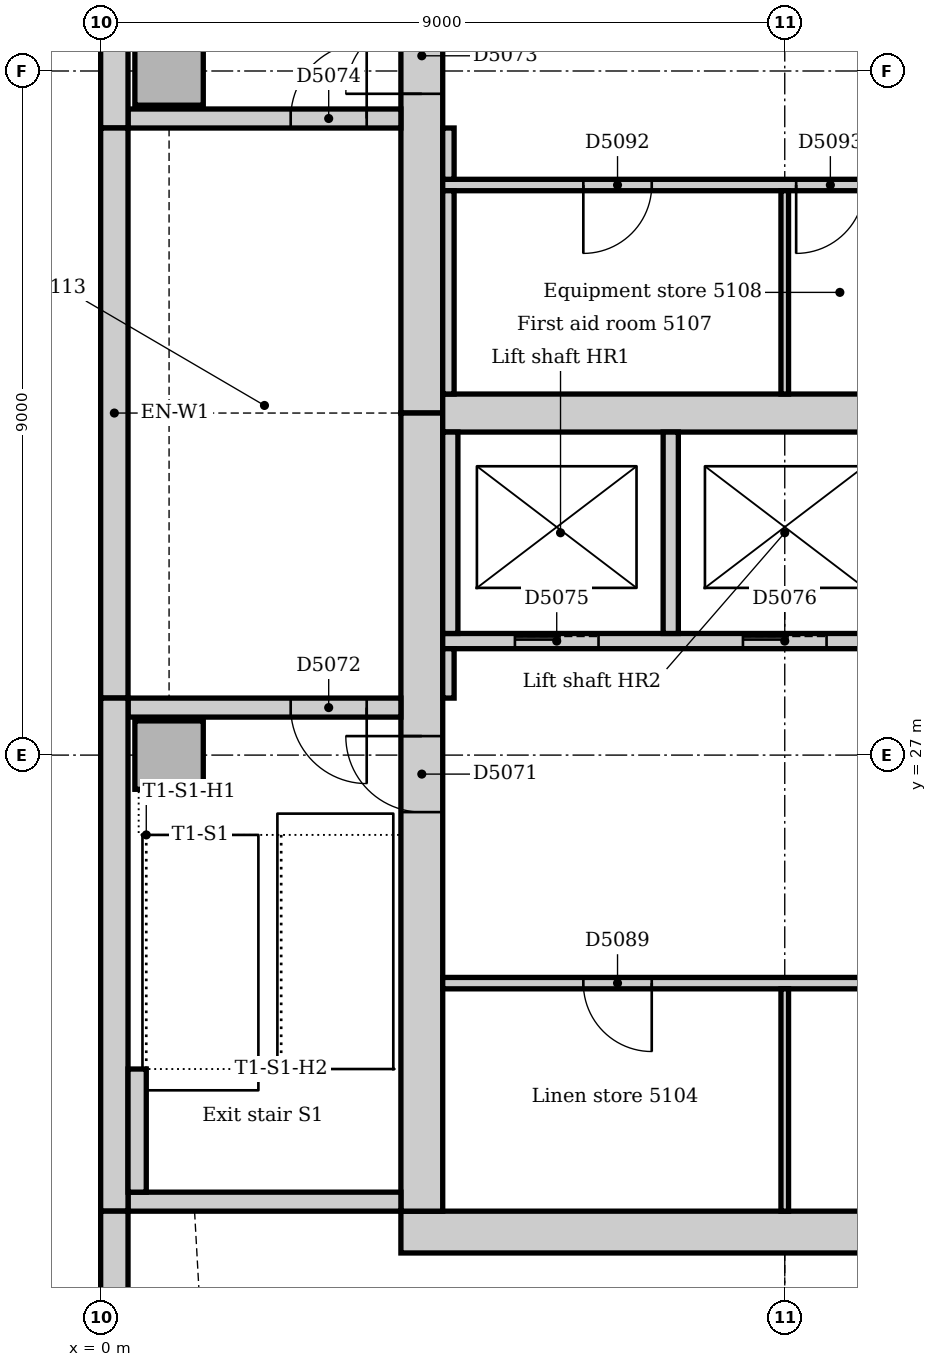
"""IFC4 building model, lengths in metres.
Left out: names, types, materials, properties, quantities, classifications, styles, units other than length and angle.
Written with IfcOpenShell. Run it as: python <this file> out.ifc"""

import sys

from ifc_helpers import new_model, si_unit, direction, frame, frame_2d, origin, origin_2d, place, context, subcontext, project, spatial, rectangle, extrude, element, fill, save


model = new_model("IFC4")
c1 = context("Model", 3, precision=1e-05, world=origin(), true_north=direction((0.0, 1.0)))
c2 = subcontext(c1, "Body", "Model", "MODEL_VIEW")
j1 = project(units=[si_unit("LENGTHUNIT", "METRE"), si_unit("PLANEANGLEUNIT", "RADIAN")], contexts=[c1])
p1 = place(None, origin())
s1 = spatial("IfcSite", under=j1, at=p1, CompositionType="ELEMENT")
p2 = place(p1, origin())
s2 = spatial("IfcBuilding", under=s1, at=p2, CompositionType="ELEMENT")
p3 = place(p2, frame((0.0, 0.0, 214.0)))
s3 = spatial("IfcBuildingStorey", under=s2, at=p3, CompositionType="ELEMENT", Elevation=214.0)
p4 = place(p3, frame((3.95, 20.725, 0.0), z_axis=(0.0, 0.0, 1.0), x_axis=(1.0, 0.0, 0.0)))
e1 = element("IfcWall", 1, at=p4, inside=s3, PredefinedType="SOLIDWALL", context=c2, shape_type="SweptSolid", body=[
    extrude(rectangle(XDim=19.1, YDim=0.55, at=frame_2d((9.55, 0.0))), origin(), (0.0, 0.0, 1.0), 4.0),
])
p5 = place(p3, frame((4.225, 42.0, 0.0), z_axis=(0.0, 0.0, 1.0), x_axis=(0.0, -1.0, 0.0)))
e2 = element("IfcWall", 2, at=p5, inside=s3, PredefinedType="SOLIDWALL", context=c2, shape_type="SweptSolid", body=[
    extrude(rectangle(XDim=10.5, YDim=0.55, at=frame_2d((5.25, 0.0))), origin(), (0.0, 0.0, 1.0), 4.0),
])
p6 = place(p5, frame((5.3, 0.0, 0.0)))
e3 = element("IfcOpeningElement", 3, at=p6, cuts=e2, PredefinedType="OPENING", context=c2, shape_type="SweptSolid", body=[
    extrude(rectangle(XDim=1.0, YDim=2.1, at=frame_2d((0.5, 1.05))), frame((0.0, 0.285, 0.0), z_axis=(0.0, -1.0, 0.0), x_axis=(1.0, 0.0, 0.0)), (0.0, 0.0, 1.0), 0.57),
])
p7 = place(p3, frame((4.225, 31.5, 0.0), z_axis=(0.0, 0.0, 1.0), x_axis=(0.0, -1.0, 0.0)))
e4 = element("IfcWall", 4, at=p7, inside=s3, PredefinedType="SOLIDWALL", context=c2, shape_type="SweptSolid", body=[
    extrude(rectangle(XDim=10.5, YDim=0.55, at=frame_2d((5.25, 0.0))), origin(), (0.0, 0.0, 1.0), 4.0),
])
p8 = place(p7, frame((4.25, 0.0, 0.0)))
e5 = element("IfcOpeningElement", 5, at=p8, cuts=e4, PredefinedType="OPENING", context=c2, shape_type="SweptSolid", body=[
    extrude(rectangle(XDim=1.0, YDim=2.1, at=frame_2d((0.5, 1.05))), frame((0.0, 0.285, 0.0), z_axis=(0.0, -1.0, 0.0), x_axis=(1.0, 0.0, 0.0)), (0.0, 0.0, 1.0), 0.57),
])
p9 = place(p3, frame((4.5, 31.5, 0.0), z_axis=(0.0, 0.0, 1.0), x_axis=(1.0, 0.0, 0.0)))
e6 = element("IfcWall", 6, at=p9, inside=s3, PredefinedType="SOLIDWALL", context=c2, shape_type="SweptSolid", body=[
    extrude(rectangle(XDim=18.0, YDim=0.5, at=frame_2d((9.0, 0.0))), origin(), (0.0, 0.0, 1.0), 4.0),
])
p10 = place(p3, frame((0.36, 21.125, 0.0), z_axis=(0.0, 0.0, 1.0), x_axis=(1.0, 0.0, 0.0)))
e7 = element("IfcWall", 7, at=p10, inside=s3, PredefinedType="SOLIDWALL", context=c2, shape_type="SweptSolid", body=[
    extrude(rectangle(XDim=3.59, YDim=0.25, at=frame_2d((1.795, 0.0))), origin(), (0.0, 0.0, 1.0), 4.0),
])
p11 = place(p3, frame((3.95, 27.625, 0.0), z_axis=(0.0, 0.0, 1.0), x_axis=(-1.0, 0.0, 0.0)))
e8 = element("IfcWall", 8, at=p11, inside=s3, PredefinedType="SOLIDWALL", context=c2, shape_type="SweptSolid", body=[
    extrude(rectangle(XDim=3.59, YDim=0.25, at=frame_2d((1.795, 0.0))), origin(), (0.0, 0.0, 1.0), 4.0),
])
p12 = place(p11, frame((0.45, 0.0, 0.0)))
e9 = element("IfcOpeningElement", 9, at=p12, cuts=e8, PredefinedType="OPENING", context=c2, shape_type="SweptSolid", body=[
    extrude(rectangle(XDim=1.0, YDim=2.1, at=frame_2d((0.5, 1.05))), frame((0.0, 0.135, 0.0), z_axis=(0.0, -1.0, 0.0), x_axis=(1.0, 0.0, 0.0)), (0.0, 0.0, 1.0), 0.27),
])
p13 = place(p3, frame((0.36, 35.375, 0.0), z_axis=(0.0, 0.0, 1.0), x_axis=(1.0, 0.0, 0.0)))
e10 = element("IfcWall", 10, at=p13, inside=s3, PredefinedType="SOLIDWALL", context=c2, shape_type="SweptSolid", body=[
    extrude(rectangle(XDim=3.59, YDim=0.25, at=frame_2d((1.795, 0.0))), origin(), (0.0, 0.0, 1.0), 4.0),
])
p14 = place(p13, frame((2.14, 0.0, 0.0)))
e11 = element("IfcOpeningElement", 11, at=p14, cuts=e10, PredefinedType="OPENING", context=c2, shape_type="SweptSolid", body=[
    extrude(rectangle(XDim=1.0, YDim=2.1, at=frame_2d((0.5, 1.05))), frame((0.0, 0.135, 0.0), z_axis=(0.0, -1.0, 0.0), x_axis=(1.0, 0.0, 0.0)), (0.0, 0.0, 1.0), 0.27),
])
for number, where, z_axis, x_axis in (
    (12, (0.9, 27.0, 0.0), (0.0, 0.0, 1.0), (1.0, 0.0, 0.0)),
    (13, (0.9, 36.0, 0.0), (0.0, 0.0, 1.0), (1.0, 0.0, 0.0)),
):
    element("IfcColumn", number, at=place(p3, frame(where, z_axis=z_axis, x_axis=x_axis)), inside=s3, PredefinedType="COLUMN", context=c2, shape_type="SweptSolid", body=[
        extrude(rectangle(XDim=0.9, YDim=0.9, at=origin_2d()), origin(), (0.0, 0.0, 1.0), 4.0),
    ])
p15 = place(p3, frame((0.18, 42.0, 0.0), z_axis=(0.0, 0.0, 1.0), x_axis=(0.0, -1.0, 0.0)))
e14 = element("IfcWall", 14, at=p15, inside=s3, PredefinedType="STANDARD", context=c2, shape_type="SweptSolid", body=[
    extrude(rectangle(XDim=6.75, YDim=0.36, at=frame_2d((3.375, 0.0))), origin(), (0.0, 0.0, 1.0), 3.85),
])
p16 = place(p3, frame((0.18, 35.25, 0.0), z_axis=(0.0, 0.0, 1.0), x_axis=(0.0, -1.0, 0.0)))
e15 = element("IfcWall", 15, at=p16, inside=s3, PredefinedType="STANDARD", context=c2, shape_type="SweptSolid", body=[
    extrude(rectangle(XDim=7.5, YDim=0.36, at=frame_2d((3.75, 0.0))), origin(), (0.0, 0.0, 1.0), 3.85),
])
p17 = place(p3, frame((0.18, 27.75, 0.0), z_axis=(0.0, 0.0, 1.0), x_axis=(0.0, -1.0, 0.0)))
e16 = element("IfcWall", 16, at=p17, inside=s3, PredefinedType="STANDARD", context=c2, shape_type="SweptSolid", body=[
    extrude(rectangle(XDim=6.75, YDim=0.36, at=frame_2d((3.375, 0.0))), origin(), (0.0, 0.0, 1.0), 3.85),
])
p18 = place(p3, frame((0.18, 21.0, 0.0), z_axis=(0.0, 0.0, 1.0), x_axis=(0.0, -1.0, 0.0)))
e17 = element("IfcWall", 17, at=p18, inside=s3, PredefinedType="STANDARD", context=c2, shape_type="SweptSolid", body=[
    extrude(rectangle(XDim=3.257, YDim=0.36, at=frame_2d((1.629, 0.0))), origin(), (0.0, 0.0, 1.0), 3.85),
])
p19 = place(p3, frame((0.48, 21.25, 0.0), z_axis=(0.0, 0.0, 1.0), x_axis=(0.0, 1.0, 0.0)))
e18 = element("IfcWall", 18, at=p19, inside=s3, PredefinedType="STANDARD", context=c2, shape_type="SweptSolid", body=[
    extrude(rectangle(XDim=1.62, YDim=0.24, at=frame_2d((0.81, 0.0))), origin(), (0.0, 0.0, 1.0), 4.0),
])
p20 = place(p3, frame((4.5, 28.5, 0.0), z_axis=(0.0, 0.0, 1.0), x_axis=(1.0, 0.0, 0.0)))
e19 = element("IfcWall", 19, at=p20, inside=s3, PredefinedType="PARTITIONING", context=c2, shape_type="SweptSolid", body=[
    extrude(rectangle(XDim=18.0, YDim=0.2, at=frame_2d((9.0, 0.0))), origin(), (0.0, 0.0, 1.0), 3.85),
])
p21 = place(p20, frame((0.95, 0.0, 0.0)))
e20 = element("IfcOpeningElement", 20, at=p21, cuts=e19, PredefinedType="OPENING", context=c2, shape_type="SweptSolid", body=[
    extrude(rectangle(XDim=1.1, YDim=2.1, at=frame_2d((0.55, 1.05))), frame((0.0, 0.11, 0.0), z_axis=(0.0, -1.0, 0.0), x_axis=(1.0, 0.0, 0.0)), (0.0, 0.0, 1.0), 0.22),
])
p22 = place(p20, frame((3.95, 0.0, 0.0)))
e21 = element("IfcOpeningElement", 21, at=p22, cuts=e19, PredefinedType="OPENING", context=c2, shape_type="SweptSolid", body=[
    extrude(rectangle(XDim=1.1, YDim=2.1, at=frame_2d((0.55, 1.05))), frame((0.0, 0.11, 0.0), z_axis=(0.0, -1.0, 0.0), x_axis=(1.0, 0.0, 0.0)), (0.0, 0.0, 1.0), 0.22),
])
p23 = place(p20, frame((6.95, 0.0, 0.0)))
e22 = element("IfcOpeningElement", 22, at=p23, cuts=e19, PredefinedType="OPENING", context=c2, shape_type="SweptSolid", body=[
    extrude(rectangle(XDim=1.1, YDim=2.1, at=frame_2d((0.55, 1.05))), frame((0.0, 0.11, 0.0), z_axis=(0.0, -1.0, 0.0), x_axis=(1.0, 0.0, 0.0)), (0.0, 0.0, 1.0), 0.22),
])
p24 = place(p20, frame((9.95, 0.0, 0.0)))
e23 = element("IfcOpeningElement", 23, at=p24, cuts=e19, PredefinedType="OPENING", context=c2, shape_type="SweptSolid", body=[
    extrude(rectangle(XDim=1.1, YDim=2.1, at=frame_2d((0.55, 1.05))), frame((0.0, 0.11, 0.0), z_axis=(0.0, -1.0, 0.0), x_axis=(1.0, 0.0, 0.0)), (0.0, 0.0, 1.0), 0.22),
])
p25 = place(p20, frame((12.95, 0.0, 0.0)))
e24 = element("IfcOpeningElement", 24, at=p25, cuts=e19, PredefinedType="OPENING", context=c2, shape_type="SweptSolid", body=[
    extrude(rectangle(XDim=1.1, YDim=2.1, at=frame_2d((0.55, 1.05))), frame((0.0, 0.11, 0.0), z_axis=(0.0, -1.0, 0.0), x_axis=(1.0, 0.0, 0.0)), (0.0, 0.0, 1.0), 0.22),
])
p26 = place(p20, frame((15.95, 0.0, 0.0)))
e25 = element("IfcOpeningElement", 25, at=p26, cuts=e19, PredefinedType="OPENING", context=c2, shape_type="SweptSolid", body=[
    extrude(rectangle(XDim=1.1, YDim=2.1, at=frame_2d((0.55, 1.05))), frame((0.0, 0.11, 0.0), z_axis=(0.0, -1.0, 0.0), x_axis=(1.0, 0.0, 0.0)), (0.0, 0.0, 1.0), 0.22),
])
for number, where, z_axis, x_axis in (
    (26, (4.6, 28.6, 0.0), (0.0, 0.0, 1.0), (0.0, 1.0, 0.0)),
    (27, (7.5, 28.6, 0.0), (0.0, 0.0, 1.0), (0.0, 1.0, 0.0)),
):
    element("IfcWall", number, at=place(p3, frame(where, z_axis=z_axis, x_axis=x_axis)), inside=s3, PredefinedType="PARTITIONING", context=c2, shape_type="SweptSolid", body=[
        extrude(rectangle(XDim=2.65, YDim=0.2, at=frame_2d((1.325, 0.0))), origin(), (0.0, 0.0, 1.0), 3.85),
    ])
p27 = place(p3, frame((4.5, 24.0, 0.0), z_axis=(0.0, 0.0, 1.0), x_axis=(1.0, 0.0, 0.0)))
e28 = element("IfcWall", 28, at=p27, inside=s3, PredefinedType="PARTITIONING", context=c2, shape_type="SweptSolid", body=[
    extrude(rectangle(XDim=18.0, YDim=0.15, at=frame_2d((9.0, 0.0))), origin(), (0.0, 0.0, 1.0), 3.85),
])
p28 = place(p27, frame((1.85, 0.0, 0.0)))
e29 = element("IfcOpeningElement", 29, at=p28, cuts=e28, PredefinedType="OPENING", context=c2, shape_type="SweptSolid", body=[
    extrude(rectangle(XDim=0.9, YDim=2.1, at=frame_2d((0.45, 1.05))), frame((0.0, 0.085, 0.0), z_axis=(0.0, -1.0, 0.0), x_axis=(1.0, 0.0, 0.0)), (0.0, 0.0, 1.0), 0.17),
])
p29 = place(p27, frame((8.55, 0.0, 0.0)))
e30 = element("IfcOpeningElement", 30, at=p29, cuts=e28, PredefinedType="OPENING", context=c2, shape_type="SweptSolid", body=[
    extrude(rectangle(XDim=0.9, YDim=2.1, at=frame_2d((0.45, 1.05))), frame((0.0, 0.085, 0.0), z_axis=(0.0, -1.0, 0.0), x_axis=(1.0, 0.0, 0.0)), (0.0, 0.0, 1.0), 0.17),
])
p30 = place(p27, frame((15.2, 0.0, 0.0)))
e31 = element("IfcOpeningElement", 31, at=p30, cuts=e28, PredefinedType="OPENING", context=c2, shape_type="SweptSolid", body=[
    extrude(rectangle(XDim=0.9, YDim=2.1, at=frame_2d((0.45, 1.05))), frame((0.0, 0.085, 0.0), z_axis=(0.0, -1.0, 0.0), x_axis=(1.0, 0.0, 0.0)), (0.0, 0.0, 1.0), 0.17),
])
p31 = place(p3, frame((4.5, 34.5, 0.0), z_axis=(0.0, 0.0, 1.0), x_axis=(1.0, 0.0, 0.0)))
e32 = element("IfcWall", 32, at=p31, inside=s3, PredefinedType="PARTITIONING", context=c2, shape_type="SweptSolid", body=[
    extrude(rectangle(XDim=5.9, YDim=0.15, at=frame_2d((2.95, 0.0))), origin(), (0.0, 0.0, 1.0), 3.85),
])
p32 = place(p31, frame((1.85, 0.0, 0.0)))
e33 = element("IfcOpeningElement", 33, at=p32, cuts=e32, PredefinedType="OPENING", context=c2, shape_type="SweptSolid", body=[
    extrude(rectangle(XDim=0.9, YDim=2.1, at=frame_2d((0.45, 1.05))), frame((0.0, 0.085, 0.0), z_axis=(0.0, -1.0, 0.0), x_axis=(1.0, 0.0, 0.0)), (0.0, 0.0, 1.0), 0.17),
])
p33 = place(p31, frame((4.65, 0.0, 0.0)))
e34 = element("IfcOpeningElement", 34, at=p33, cuts=e32, PredefinedType="OPENING", context=c2, shape_type="SweptSolid", body=[
    extrude(rectangle(XDim=0.9, YDim=2.1, at=frame_2d((0.45, 1.05))), frame((0.0, 0.085, 0.0), z_axis=(0.0, -1.0, 0.0), x_axis=(1.0, 0.0, 0.0)), (0.0, 0.0, 1.0), 0.17),
])
p34 = place(p3, frame((4.575, 34.575, 0.0), z_axis=(0.0, 0.0, 1.0), x_axis=(0.0, 1.0, 0.0)))
e35 = element("IfcWall", 35, at=p34, inside=s3, PredefinedType="PARTITIONING", context=c2, shape_type="SweptSolid", body=[
    extrude(rectangle(XDim=0.675, YDim=0.15, at=frame_2d((0.338, 0.0))), origin(), (0.0, 0.0, 1.0), 3.85),
])
p35 = place(p3, frame((4.575, 31.75, 0.0), z_axis=(0.0, 0.0, 1.0), x_axis=(0.0, 1.0, 0.0)))
e36 = element("IfcWall", 36, at=p35, inside=s3, PredefinedType="PARTITIONING", context=c2, shape_type="SweptSolid", body=[
    extrude(rectangle(XDim=2.675, YDim=0.15, at=frame_2d((1.337, 0.0))), origin(), (0.0, 0.0, 1.0), 3.85),
])
p36 = place(p3, frame((4.575, 27.75, 0.0), z_axis=(0.0, 0.0, 1.0), x_axis=(0.0, 1.0, 0.0)))
e37 = element("IfcWall", 37, at=p36, inside=s3, PredefinedType="PARTITIONING", context=c2, shape_type="SweptSolid", body=[
    extrude(rectangle(XDim=0.65, YDim=0.15, at=frame_2d((0.325, 0.0))), origin(), (0.0, 0.0, 1.0), 3.85),
])
p37 = place(p3, frame((9.0, 21.0, 0.0), z_axis=(0.0, 0.0, 1.0), x_axis=(0.0, 1.0, 0.0)))
e38 = element("IfcWall", 38, at=p37, inside=s3, PredefinedType="PARTITIONING", context=c2, shape_type="SweptSolid", body=[
    extrude(rectangle(XDim=2.925, YDim=0.1, at=frame_2d((1.462, 0.0))), origin(), (0.0, 0.0, 1.0), 3.85),
])
p38 = place(p3, frame((9.0, 31.75, 0.0), z_axis=(0.0, 0.0, 1.0), x_axis=(0.0, 1.0, 0.0)))
e39 = element("IfcWall", 39, at=p38, inside=s3, PredefinedType="PARTITIONING", context=c2, shape_type="SweptSolid", body=[
    extrude(rectangle(XDim=2.675, YDim=0.1, at=frame_2d((1.337, 0.0))), origin(), (0.0, 0.0, 1.0), 3.85),
])
p39 = place(p8, frame((1.0, 0.0, 0.0), z_axis=(0.0, 0.0, 1.0), x_axis=(-1.0, 0.0, 0.0)))
e40 = element("IfcDoor", 40, at=p39, inside=s3, OperationType="SINGLE_SWING_RIGHT", PredefinedType="DOOR", context=c2, shape_type="SweptSolid", body=[
    extrude(rectangle(XDim=1.0, YDim=2.1, at=frame_2d((0.5, 1.05))), frame((0.0, 0.025, 0.0), z_axis=(0.0, -1.0, 0.0), x_axis=(1.0, 0.0, 0.0)), (0.0, 0.0, 1.0), 0.05),
])
fill(e5, e40)
p40 = place(p12, origin())
e41 = element("IfcDoor", 41, at=p40, inside=s3, OperationType="SINGLE_SWING_LEFT", PredefinedType="DOOR", context=c2, shape_type="SweptSolid", body=[
    extrude(rectangle(XDim=1.0, YDim=2.1, at=frame_2d((0.5, 1.05))), frame((0.0, 0.025, 0.0), z_axis=(0.0, -1.0, 0.0), x_axis=(1.0, 0.0, 0.0)), (0.0, 0.0, 1.0), 0.05),
])
fill(e9, e41)
p41 = place(p6, frame((1.0, 0.0, 0.0), z_axis=(0.0, 0.0, 1.0), x_axis=(-1.0, 0.0, 0.0)))
e42 = element("IfcDoor", 42, at=p41, inside=s3, OperationType="SINGLE_SWING_LEFT", PredefinedType="DOOR", context=c2, shape_type="SweptSolid", body=[
    extrude(rectangle(XDim=1.0, YDim=2.1, at=frame_2d((0.5, 1.05))), frame((0.0, 0.025, 0.0), z_axis=(0.0, -1.0, 0.0), x_axis=(1.0, 0.0, 0.0)), (0.0, 0.0, 1.0), 0.05),
])
fill(e3, e42)
p42 = place(p14, origin())
e43 = element("IfcDoor", 43, at=p42, inside=s3, OperationType="SINGLE_SWING_RIGHT", PredefinedType="DOOR", context=c2, shape_type="SweptSolid", body=[
    extrude(rectangle(XDim=1.0, YDim=2.1, at=frame_2d((0.5, 1.05))), frame((0.0, 0.025, 0.0), z_axis=(0.0, -1.0, 0.0), x_axis=(1.0, 0.0, 0.0)), (0.0, 0.0, 1.0), 0.05),
])
fill(e11, e43)
p43 = place(p21, origin())
e44 = element("IfcDoor", 44, at=p43, inside=s3, OperationType="SLIDING_TO_LEFT", PredefinedType="DOOR", context=c2, shape_type="SweptSolid", body=[
    extrude(rectangle(XDim=1.1, YDim=2.1, at=frame_2d((0.55, 1.05))), frame((0.0, 0.025, 0.0), z_axis=(0.0, -1.0, 0.0), x_axis=(1.0, 0.0, 0.0)), (0.0, 0.0, 1.0), 0.05),
])
fill(e20, e44)
p44 = place(p22, origin())
e45 = element("IfcDoor", 45, at=p44, inside=s3, OperationType="SLIDING_TO_LEFT", PredefinedType="DOOR", context=c2, shape_type="SweptSolid", body=[
    extrude(rectangle(XDim=1.1, YDim=2.1, at=frame_2d((0.55, 1.05))), frame((0.0, 0.025, 0.0), z_axis=(0.0, -1.0, 0.0), x_axis=(1.0, 0.0, 0.0)), (0.0, 0.0, 1.0), 0.05),
])
fill(e21, e45)
p45 = place(p28, frame((0.9, 0.0, 0.0), z_axis=(0.0, 0.0, 1.0), x_axis=(-1.0, 0.0, 0.0)))
e46 = element("IfcDoor", 46, at=p45, inside=s3, OperationType="SINGLE_SWING_LEFT", PredefinedType="DOOR", context=c2, shape_type="SweptSolid", body=[
    extrude(rectangle(XDim=0.9, YDim=2.1, at=frame_2d((0.45, 1.05))), frame((0.0, 0.025, 0.0), z_axis=(0.0, -1.0, 0.0), x_axis=(1.0, 0.0, 0.0)), (0.0, 0.0, 1.0), 0.05),
])
fill(e29, e46)
p46 = place(p32, frame((0.9, 0.0, 0.0), z_axis=(0.0, 0.0, 1.0), x_axis=(-1.0, 0.0, 0.0)))
e47 = element("IfcDoor", 47, at=p46, inside=s3, OperationType="SINGLE_SWING_RIGHT", PredefinedType="DOOR", context=c2, shape_type="SweptSolid", body=[
    extrude(rectangle(XDim=0.9, YDim=2.1, at=frame_2d((0.45, 1.05))), frame((0.0, 0.025, 0.0), z_axis=(0.0, -1.0, 0.0), x_axis=(1.0, 0.0, 0.0)), (0.0, 0.0, 1.0), 0.05),
])
fill(e33, e47)
p47 = place(p33, frame((0.9, 0.0, 0.0), z_axis=(0.0, 0.0, 1.0), x_axis=(-1.0, 0.0, 0.0)))
e48 = element("IfcDoor", 48, at=p47, inside=s3, OperationType="SINGLE_SWING_RIGHT", PredefinedType="DOOR", context=c2, shape_type="SweptSolid", body=[
    extrude(rectangle(XDim=0.9, YDim=2.1, at=frame_2d((0.45, 1.05))), frame((0.0, 0.025, 0.0), z_axis=(0.0, -1.0, 0.0), x_axis=(1.0, 0.0, 0.0)), (0.0, 0.0, 1.0), 0.05),
])
fill(e34, e48)
save(model, sys.argv[1])
